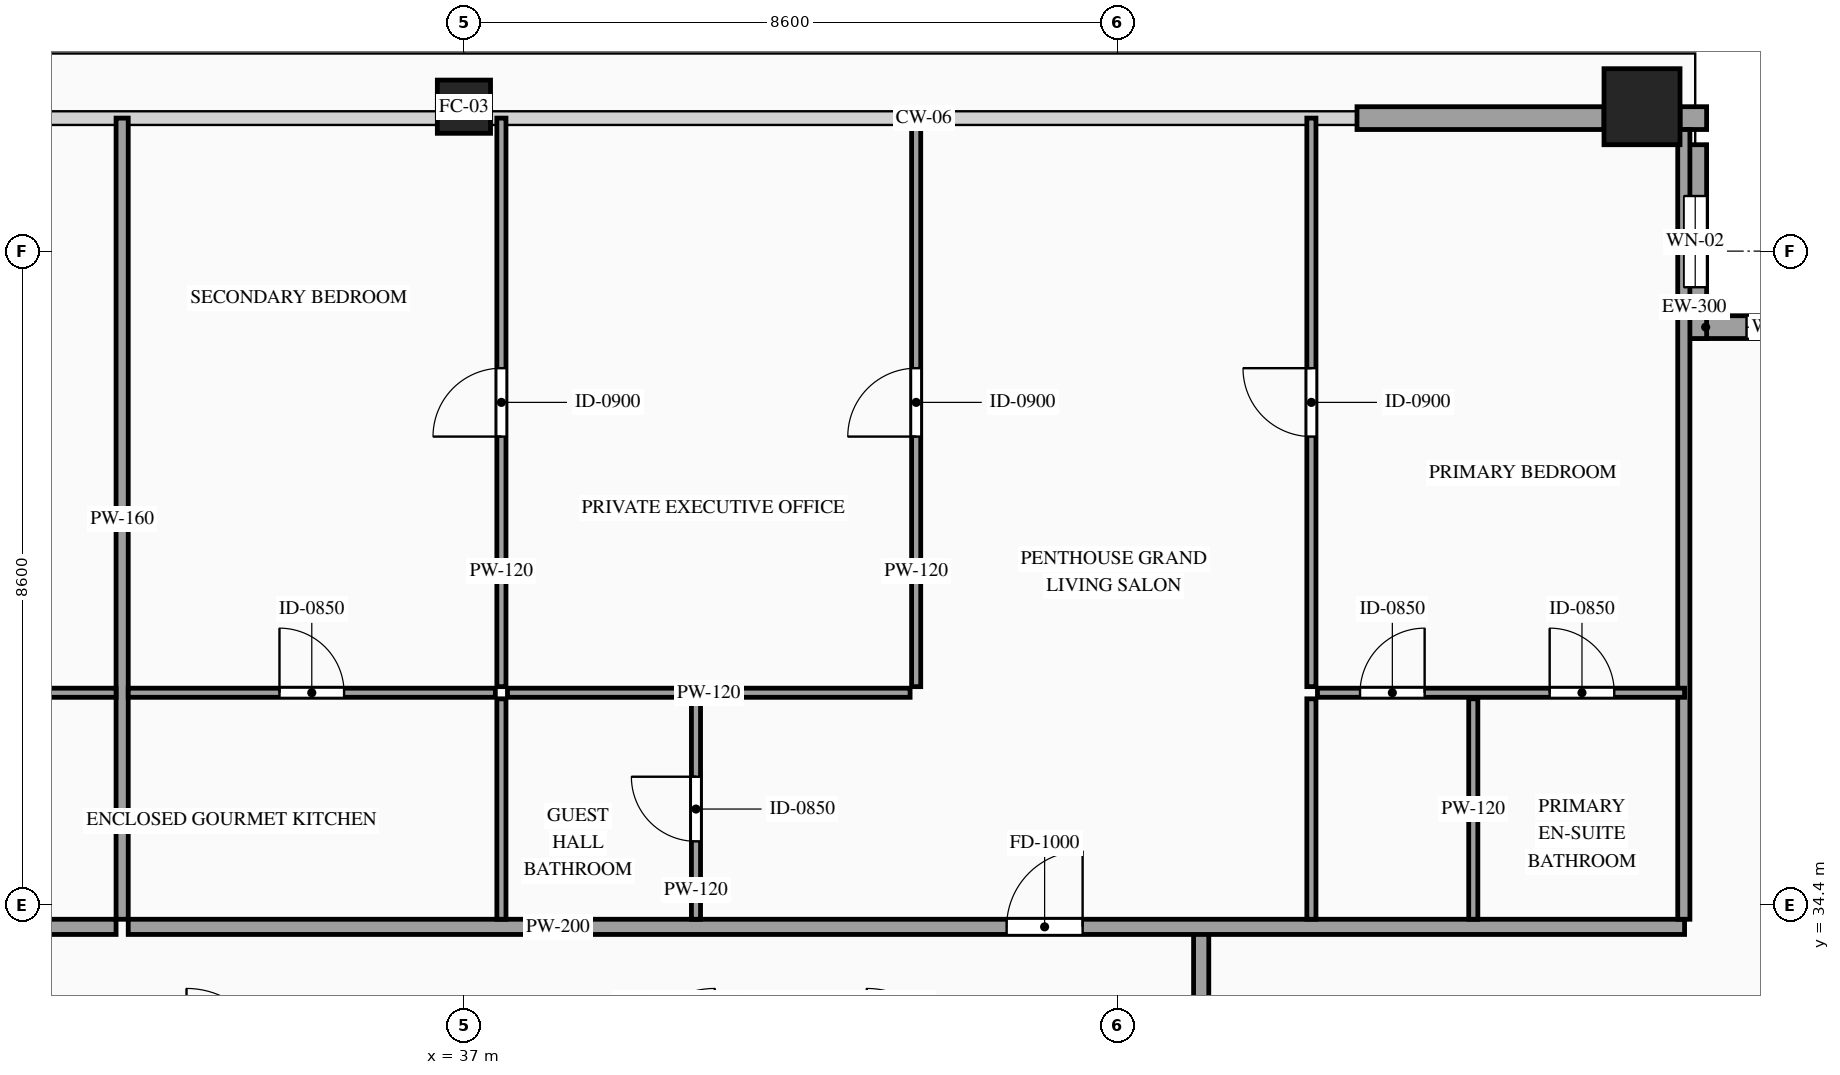
"""IFC4 building model, lengths in metres.
Left out: names, types, materials, properties, quantities, classifications, styles, units other than length and angle.
Written with IfcOpenShell. Run it as: python <this file> out.ifc"""

import sys

from ifc_helpers import new_model, si_unit, direction, frame, frame_2d, origin, origin_2d, place, context, subcontext, project, spatial, rectangle, hollow_rectangle, extrude, source, transform, mapped, element, fill, save


model = new_model("IFC4")
c1 = context("Model", 3, precision=1e-05, world=origin(), true_north=direction((0.0, 1.0)))
c2 = subcontext(c1, "Body", "Model", "MODEL_VIEW")
j1 = project(units=[si_unit("LENGTHUNIT", "METRE"), si_unit("PLANEANGLEUNIT", "RADIAN")], contexts=[c1])
p1 = place(None, origin())
s1 = spatial("IfcSite", under=j1, at=p1, CompositionType="ELEMENT")
p2 = place(p1, origin())
s2 = spatial("IfcBuilding", under=s1, at=p2, CompositionType="ELEMENT")
p3 = place(p2, frame((0.0, 0.0, 347.2)))
s3 = spatial("IfcBuildingStorey", under=s2, at=p3, CompositionType="ELEMENT", Elevation=347.2)
m1 = source(origin(), c2, "Body", "SweptSolid", [
    extrude(hollow_rectangle(XDim=0.7, YDim=0.7, WallThickness=0.032, at=origin_2d()), origin(), (0.0, 0.0, 1.0), 4.0),
])
p4 = place(p3, frame((37.0, 44.9, 0.0), z_axis=(0.0, 0.0, 1.0), x_axis=(1.0, 0.0, 0.0)))
e1 = element("IfcColumn", 1, at=p4, inside=s3, PredefinedType="COLUMN", context=c2, shape_type="MappedRepresentation", body=[
    mapped(m1, transform((0.0, 0.0, 0.0), scale=1.0)),
])
m2 = source(origin(), c2, "Body", "SweptSolid", [
    extrude(hollow_rectangle(XDim=1.0, YDim=1.0, WallThickness=0.048, at=origin_2d()), origin(), (0.0, 0.0, 1.0), 4.0),
])
p5 = place(p3, frame((52.5, 44.9, 0.0), z_axis=(0.0, 0.0, 1.0), x_axis=(1.0, 0.0, 0.0)))
e2 = element("IfcColumn", 2, at=p5, inside=s3, PredefinedType="COLUMN", context=c2, shape_type="MappedRepresentation", body=[
    mapped(m2, transform((0.0, 0.0, 0.0), scale=1.0)),
])
p6 = place(p3, frame((55.6, 42.0, 0.0), z_axis=(0.0, 0.0, 1.0), x_axis=(-1.0, 0.0, 0.0)))
e3 = element("IfcWall", 3, at=p6, inside=s3, PredefinedType="SOLIDWALL", context=c2, shape_type="SweptSolid", body=[
    extrude(rectangle(XDim=2.55, YDim=0.3, at=frame_2d((1.275, 0.0))), origin(), (0.0, 0.0, 1.0), 3.7),
])
p7 = place(p6, frame((0.825, 0.0, 0.85)))
e4 = element("IfcOpeningElement", 4, at=p7, cuts=e3, PredefinedType="OPENING", context=c2, shape_type="SweptSolid", body=[
    extrude(rectangle(XDim=0.9, YDim=1.5, at=frame_2d((0.45, 0.75))), frame((0.0, 0.165, 0.0), z_axis=(0.0, -1.0, 0.0), x_axis=(1.0, 0.0, 0.0)), (0.0, 0.0, 1.0), 0.33),
])
p8 = place(p3, frame((53.2, 41.85, 0.0), z_axis=(0.0, 0.0, 1.0), x_axis=(0.0, 1.0, 0.0)))
e5 = element("IfcWall", 5, at=p8, inside=s3, PredefinedType="SOLIDWALL", context=c2, shape_type="SweptSolid", body=[
    extrude(rectangle(XDim=2.55, YDim=0.3, at=frame_2d((1.275, 0.0))), origin(), (0.0, 0.0, 1.0), 3.7),
])
p9 = place(p8, frame((0.675, 0.0, 0.85)))
e6 = element("IfcOpeningElement", 6, at=p9, cuts=e5, PredefinedType="OPENING", context=c2, shape_type="SweptSolid", body=[
    extrude(rectangle(XDim=1.2, YDim=2.1, at=frame_2d((0.6, 1.05))), frame((0.0, 0.165, 0.0), z_axis=(0.0, -1.0, 0.0), x_axis=(1.0, 0.0, 0.0)), (0.0, 0.0, 1.0), 0.33),
])
m3 = source(origin(), c2, "Body", "SweptSolid", [
    extrude(rectangle(XDim=0.35, YDim=0.3, at=frame_2d((0.175, 0.0))), origin(), (0.0, 0.0, 1.0), 3.7),
])
p10 = place(p3, frame((53.0, 44.75, 0.0), z_axis=(0.0, 0.0, 1.0), x_axis=(1.0, 0.0, 0.0)))
e7 = element("IfcWall", 7, at=p10, inside=s3, PredefinedType="SOLIDWALL", context=c2, shape_type="MappedRepresentation", body=[
    mapped(m3, transform((0.0, 0.0, 0.0), scale=1.0)),
])
m4 = source(origin(), c2, "Body", "SweptSolid", [
    extrude(rectangle(XDim=3.25, YDim=0.3, at=frame_2d((1.625, 0.0))), origin(), (0.0, 0.0, 1.0), 3.305),
])
p11 = place(p3, frame((48.75, 44.75, 0.0), z_axis=(0.0, 0.0, 1.0), x_axis=(1.0, 0.0, 0.0)))
e8 = element("IfcWall", 8, at=p11, inside=s3, PredefinedType="SOLIDWALL", context=c2, shape_type="MappedRepresentation", body=[
    mapped(m4, transform((0.0, 0.0, 0.0), scale=1.0)),
])
m5 = source(origin(), c2, "Body", "SweptSolid", [
    extrude(rectangle(XDim=1.7, YDim=0.2, at=frame_2d((0.85, 0.0))), origin(), (0.0, 0.0, 1.0), 3.7),
])
p12 = place(p3, frame((46.7, 32.35, 0.0), z_axis=(0.0, 0.0, 1.0), x_axis=(0.0, 1.0, 0.0)))
e9 = element("IfcWall", 9, at=p12, inside=s3, PredefinedType="PARTITIONING", context=c2, shape_type="MappedRepresentation", body=[
    mapped(m5, transform((0.0, 0.0, 0.0), scale=1.0)),
])
p13 = place(p3, frame((20.94, 34.11, 0.0), z_axis=(0.0, 0.0, 1.0), x_axis=(1.0, 0.0, 0.0)))
e10 = element("IfcWall", 10, at=p13, inside=s3, PredefinedType="PARTITIONING", context=c2, shape_type="SweptSolid", body=[
    extrude(rectangle(XDim=11.483, YDim=0.2, at=frame_2d((5.742, 0.0))), origin(), (0.0, 0.0, 1.0), 3.7),
])
p14 = place(p13, frame((4.552, 0.0, 0.0)))
e11 = element("IfcOpeningElement", 11, at=p14, cuts=e10, PredefinedType="OPENING", context=c2, shape_type="SweptSolid", body=[
    extrude(rectangle(XDim=1.0, YDim=2.2, at=frame_2d((0.5, 1.1))), frame((0.0, 0.115, 0.0), z_axis=(0.0, -1.0, 0.0), x_axis=(1.0, 0.0, 0.0)), (0.0, 0.0, 1.0), 0.23),
])
m6 = source(origin(), c2, "Body", "SweptSolid", [
    extrude(rectangle(XDim=10.54, YDim=0.16, at=frame_2d((5.27, 0.0))), origin(), (0.0, 0.0, 1.0), 3.7),
])
p15 = place(p3, frame((32.503, 34.21, 0.0), z_axis=(0.0, 0.0, 1.0), x_axis=(0.0, 1.0, 0.0)))
e12 = element("IfcWall", 12, at=p15, inside=s3, PredefinedType="PARTITIONING", context=c2, shape_type="MappedRepresentation", body=[
    mapped(m6, transform((0.0, 0.0, 0.0), scale=1.0)),
])
m7 = source(origin(), c2, "Body", "SweptSolid", [
    extrude(rectangle(XDim=4.823, YDim=0.12, at=frame_2d((2.412, 0.0))), origin(), (0.0, 0.0, 1.0), 3.7),
])
p16 = place(p3, frame((27.6, 37.19, 0.0), z_axis=(0.0, 0.0, 1.0), x_axis=(1.0, 0.0, 0.0)))
e13 = element("IfcWall", 13, at=p16, inside=s3, PredefinedType="PARTITIONING", context=c2, shape_type="MappedRepresentation", body=[
    mapped(m7, transform((0.0, 0.0, 0.0), scale=1.0)),
])
p17 = place(p3, frame((32.583, 34.11, 0.0), z_axis=(0.0, 0.0, 1.0), x_axis=(1.0, 0.0, 0.0)))
e14 = element("IfcWall", 14, at=p17, inside=s3, PredefinedType="PARTITIONING", context=c2, shape_type="SweptSolid", body=[
    extrude(rectangle(XDim=20.477, YDim=0.2, at=frame_2d((10.239, 0.0))), origin(), (0.0, 0.0, 1.0), 3.7),
])
p18 = place(p17, frame((11.557, 0.0, 0.0)))
e15 = element("IfcOpeningElement", 15, at=p18, cuts=e14, PredefinedType="OPENING", context=c2, shape_type="SweptSolid", body=[
    extrude(rectangle(XDim=1.0, YDim=2.2, at=frame_2d((0.5, 1.1))), frame((0.0, 0.115, 0.0), z_axis=(0.0, -1.0, 0.0), x_axis=(1.0, 0.0, 0.0)), (0.0, 0.0, 1.0), 0.23),
])
m8 = source(origin(), c2, "Body", "SweptSolid", [
    extrude(rectangle(XDim=10.39, YDim=0.16, at=frame_2d((5.195, 0.0))), origin(), (0.0, 0.0, 1.0), 3.7),
])
p19 = place(p3, frame((53.05, 34.21, 0.0), z_axis=(0.0, 0.0, 1.0), x_axis=(0.0, 1.0, 0.0)))
e16 = element("IfcWall", 16, at=p19, inside=s3, PredefinedType="PARTITIONING", context=c2, shape_type="MappedRepresentation", body=[
    mapped(m8, transform((0.0, 0.0, 0.0), scale=1.0)),
])
p20 = place(p3, frame((32.583, 37.19, 0.0), z_axis=(0.0, 0.0, 1.0), x_axis=(1.0, 0.0, 0.0)))
e17 = element("IfcWall", 17, at=p20, inside=s3, PredefinedType="PARTITIONING", context=c2, shape_type="SweptSolid", body=[
    extrude(rectangle(XDim=4.83, YDim=0.12, at=frame_2d((2.415, 0.0))), origin(), (0.0, 0.0, 1.0), 3.7),
])
p21 = place(p20, frame((1.99, 0.0, 0.0)))
e18 = element("IfcOpeningElement", 18, at=p21, cuts=e17, PredefinedType="OPENING", context=c2, shape_type="SweptSolid", body=[
    extrude(rectangle(XDim=0.85, YDim=2.1, at=frame_2d((0.425, 1.05))), frame((0.0, 0.075, 0.0), z_axis=(0.0, -1.0, 0.0), x_axis=(1.0, 0.0, 0.0)), (0.0, 0.0, 1.0), 0.15),
])
m9 = source(origin(), c2, "Body", "SweptSolid", [
    extrude(rectangle(XDim=2.9, YDim=0.12, at=frame_2d((1.45, 0.0))), origin(), (0.0, 0.0, 1.0), 3.7),
])
p22 = place(p3, frame((37.493, 34.21, 0.0), z_axis=(0.0, 0.0, 1.0), x_axis=(0.0, 1.0, 0.0)))
e19 = element("IfcWall", 19, at=p22, inside=s3, PredefinedType="PARTITIONING", context=c2, shape_type="MappedRepresentation", body=[
    mapped(m9, transform((0.0, 0.0, 0.0), scale=1.0)),
])
p23 = place(p3, frame((40.053, 34.21, 0.0), z_axis=(0.0, 0.0, 1.0), x_axis=(0.0, 1.0, 0.0)))
e20 = element("IfcWall", 20, at=p23, inside=s3, PredefinedType="PARTITIONING", context=c2, shape_type="SweptSolid", body=[
    extrude(rectangle(XDim=2.9, YDim=0.12, at=frame_2d((1.45, 0.0))), origin(), (0.0, 0.0, 1.0), 3.7),
])
p24 = place(p23, frame((1.025, 0.0, 0.0)))
e21 = element("IfcOpeningElement", 21, at=p24, cuts=e20, PredefinedType="OPENING", context=c2, shape_type="SweptSolid", body=[
    extrude(rectangle(XDim=0.85, YDim=2.1, at=frame_2d((0.425, 1.05))), frame((0.0, 0.075, 0.0), z_axis=(0.0, -1.0, 0.0), x_axis=(1.0, 0.0, 0.0)), (0.0, 0.0, 1.0), 0.15),
])
m10 = source(origin(), c2, "Body", "SweptSolid", [
    extrude(rectangle(XDim=2.9, YDim=0.12, at=frame_2d((1.45, 0.0))), origin(), (0.0, 0.0, 1.0), 3.245),
])
p25 = place(p3, frame((50.28, 34.21, 0.0), z_axis=(0.0, 0.0, 1.0), x_axis=(0.0, 1.0, 0.0)))
e22 = element("IfcWall", 22, at=p25, inside=s3, PredefinedType="PARTITIONING", context=c2, shape_type="MappedRepresentation", body=[
    mapped(m10, transform((0.0, 0.0, 0.0), scale=1.0)),
])
p26 = place(p3, frame((48.15, 34.21, 0.0), z_axis=(0.0, 0.0, 1.0), x_axis=(0.0, 1.0, 0.0)))
e23 = element("IfcWall", 23, at=p26, inside=s3, PredefinedType="PARTITIONING", context=c2, shape_type="MappedRepresentation", body=[
    mapped(m9, transform((0.0, 0.0, 0.0), scale=1.0)),
])
p27 = place(p3, frame((37.493, 37.27, 0.0), z_axis=(0.0, 0.0, 1.0), x_axis=(0.0, 1.0, 0.0)))
e24 = element("IfcWall", 24, at=p27, inside=s3, PredefinedType="PARTITIONING", context=c2, shape_type="SweptSolid", body=[
    extrude(rectangle(XDim=7.48, YDim=0.12, at=frame_2d((3.74, 0.0))), origin(), (0.0, 0.0, 1.0), 3.7),
])
p28 = place(p27, frame((3.29, 0.0, 0.0)))
e25 = element("IfcOpeningElement", 25, at=p28, cuts=e24, PredefinedType="OPENING", context=c2, shape_type="SweptSolid", body=[
    extrude(rectangle(XDim=0.9, YDim=2.15, at=frame_2d((0.45, 1.075))), frame((0.0, 0.075, 0.0), z_axis=(0.0, -1.0, 0.0), x_axis=(1.0, 0.0, 0.0)), (0.0, 0.0, 1.0), 0.15),
])
p29 = place(p3, frame((48.23, 37.19, 0.0), z_axis=(0.0, 0.0, 1.0), x_axis=(1.0, 0.0, 0.0)))
e26 = element("IfcWall", 26, at=p29, inside=s3, PredefinedType="PARTITIONING", context=c2, shape_type="SweptSolid", body=[
    extrude(rectangle(XDim=4.83, YDim=0.12, at=frame_2d((2.415, 0.0))), origin(), (0.0, 0.0, 1.0), 3.7),
])
p30 = place(p29, frame((3.055, 0.0, 0.0)))
e27 = element("IfcOpeningElement", 27, at=p30, cuts=e26, PredefinedType="OPENING", context=c2, shape_type="SweptSolid", body=[
    extrude(rectangle(XDim=0.85, YDim=2.1, at=frame_2d((0.425, 1.05))), frame((0.0, 0.075, 0.0), z_axis=(0.0, -1.0, 0.0), x_axis=(1.0, 0.0, 0.0)), (0.0, 0.0, 1.0), 0.15),
])
p31 = place(p29, frame((0.56, 0.0, 0.0)))
e28 = element("IfcOpeningElement", 28, at=p31, cuts=e26, PredefinedType="OPENING", context=c2, shape_type="SweptSolid", body=[
    extrude(rectangle(XDim=0.85, YDim=2.1, at=frame_2d((0.425, 1.05))), frame((0.0, 0.075, 0.0), z_axis=(0.0, -1.0, 0.0), x_axis=(1.0, 0.0, 0.0)), (0.0, 0.0, 1.0), 0.15),
])
p32 = place(p3, frame((48.15, 37.27, 0.0), z_axis=(0.0, 0.0, 1.0), x_axis=(0.0, 1.0, 0.0)))
e29 = element("IfcWall", 29, at=p32, inside=s3, PredefinedType="PARTITIONING", context=c2, shape_type="SweptSolid", body=[
    extrude(rectangle(XDim=7.48, YDim=0.12, at=frame_2d((3.74, 0.0))), origin(), (0.0, 0.0, 1.0), 3.7),
])
p33 = place(p32, frame((3.29, 0.0, 0.0)))
e30 = element("IfcOpeningElement", 30, at=p33, cuts=e29, PredefinedType="OPENING", context=c2, shape_type="SweptSolid", body=[
    extrude(rectangle(XDim=0.9, YDim=2.15, at=frame_2d((0.45, 1.075))), frame((0.0, 0.075, 0.0), z_axis=(0.0, -1.0, 0.0), x_axis=(1.0, 0.0, 0.0)), (0.0, 0.0, 1.0), 0.15),
])
m11 = source(origin(), c2, "Body", "SweptSolid", [
    extrude(rectangle(XDim=5.297, YDim=0.12, at=frame_2d((2.648, 0.0))), origin(), (0.0, 0.0, 1.0), 3.7),
])
p34 = place(p3, frame((37.573, 37.19, 0.0), z_axis=(0.0, 0.0, 1.0), x_axis=(1.0, 0.0, 0.0)))
e31 = element("IfcWall", 31, at=p34, inside=s3, PredefinedType="PARTITIONING", context=c2, shape_type="MappedRepresentation", body=[
    mapped(m11, transform((0.0, 0.0, 0.0), scale=1.0)),
])
p35 = place(p3, frame((42.95, 37.27, 0.0), z_axis=(0.0, 0.0, 1.0), x_axis=(0.0, 1.0, 0.0)))
e32 = element("IfcWall", 32, at=p35, inside=s3, PredefinedType="PARTITIONING", context=c2, shape_type="SweptSolid", body=[
    extrude(rectangle(XDim=7.48, YDim=0.12, at=frame_2d((3.74, 0.0))), origin(), (0.0, 0.0, 1.0), 3.7),
])
p36 = place(p35, frame((3.29, 0.0, 0.0)))
e33 = element("IfcOpeningElement", 33, at=p36, cuts=e32, PredefinedType="OPENING", context=c2, shape_type="SweptSolid", body=[
    extrude(rectangle(XDim=0.9, YDim=2.15, at=frame_2d((0.45, 1.075))), frame((0.0, 0.075, 0.0), z_axis=(0.0, -1.0, 0.0), x_axis=(1.0, 0.0, 0.0)), (0.0, 0.0, 1.0), 0.15),
])
m12 = source(origin(), c2, "Body", "SweptSolid", [
    extrude(rectangle(XDim=0.9, YDim=1.5, at=frame_2d((0.45, 0.75))), frame((0.0, 0.03, 0.0), z_axis=(0.0, -1.0, 0.0), x_axis=(1.0, 0.0, 0.0)), (0.0, 0.0, 1.0), 0.06),
])
p37 = place(p7, origin())
e34 = element("IfcWindow", 34, at=p37, inside=s3, PartitioningType="SINGLE_PANEL", PredefinedType="WINDOW", context=c2, shape_type="MappedRepresentation", body=[
    mapped(m12, transform((0.0, 0.0, 0.0), scale=1.0)),
])
fill(e4, e34)
m13 = source(origin(), c2, "Body", "SweptSolid", [
    extrude(rectangle(XDim=1.2, YDim=2.1, at=frame_2d((0.6, 1.05))), frame((0.0, 0.03, 0.0), z_axis=(0.0, -1.0, 0.0), x_axis=(1.0, 0.0, 0.0)), (0.0, 0.0, 1.0), 0.06),
])
p38 = place(p9, origin())
e35 = element("IfcWindow", 35, at=p38, inside=s3, PartitioningType="SINGLE_PANEL", PredefinedType="WINDOW", context=c2, shape_type="MappedRepresentation", body=[
    mapped(m13, transform((0.0, 0.0, 0.0), scale=1.0)),
])
fill(e6, e35)
m14 = source(origin(), c2, "Body", "SweptSolid", [
    extrude(rectangle(XDim=1.0, YDim=2.2, at=frame_2d((0.5, 1.1))), frame((0.0, 0.025, 0.0), z_axis=(0.0, -1.0, 0.0), x_axis=(1.0, 0.0, 0.0)), (0.0, 0.0, 1.0), 0.05),
])
p39 = place(p18, origin())
e36 = element("IfcDoor", 36, at=p39, inside=s3, OperationType="SINGLE_SWING_RIGHT", PredefinedType="DOOR", context=c2, shape_type="MappedRepresentation", body=[
    mapped(m14, transform((0.0, 0.0, 0.0), scale=1.0)),
])
fill(e15, e36)
m15 = source(origin(), c2, "Body", "SweptSolid", [
    extrude(rectangle(XDim=0.85, YDim=2.1, at=frame_2d((0.425, 1.05))), frame((0.0, 0.025, 0.0), z_axis=(0.0, -1.0, 0.0), x_axis=(1.0, 0.0, 0.0)), (0.0, 0.0, 1.0), 0.05),
])
p40 = place(p21, origin())
e37 = element("IfcDoor", 37, at=p40, inside=s3, OperationType="SINGLE_SWING_LEFT", PredefinedType="DOOR", context=c2, shape_type="MappedRepresentation", body=[
    mapped(m15, transform((0.0, 0.0, 0.0), scale=1.0)),
])
fill(e18, e37)
p41 = place(p24, origin())
e38 = element("IfcDoor", 38, at=p41, inside=s3, OperationType="SINGLE_SWING_RIGHT", PredefinedType="DOOR", context=c2, shape_type="MappedRepresentation", body=[
    mapped(m15, transform((0.0, 0.0, 0.0), scale=1.0)),
])
fill(e21, e38)
p42 = place(p30, origin())
e39 = element("IfcDoor", 39, at=p42, inside=s3, OperationType="SINGLE_SWING_LEFT", PredefinedType="DOOR", context=c2, shape_type="MappedRepresentation", body=[
    mapped(m15, transform((0.0, 0.0, 0.0), scale=1.0)),
])
fill(e27, e39)
p43 = place(p31, origin())
e40 = element("IfcDoor", 40, at=p43, inside=s3, OperationType="SINGLE_SWING_RIGHT", PredefinedType="DOOR", context=c2, shape_type="MappedRepresentation", body=[
    mapped(m15, transform((0.0, 0.0, 0.0), scale=1.0)),
])
fill(e28, e40)
m16 = source(origin(), c2, "Body", "SweptSolid", [
    extrude(rectangle(XDim=0.9, YDim=2.15, at=frame_2d((0.45, 1.075))), frame((0.0, 0.025, 0.0), z_axis=(0.0, -1.0, 0.0), x_axis=(1.0, 0.0, 0.0)), (0.0, 0.0, 1.0), 0.05),
])
p44 = place(p28, origin())
e41 = element("IfcDoor", 41, at=p44, inside=s3, OperationType="SINGLE_SWING_LEFT", PredefinedType="DOOR", context=c2, shape_type="MappedRepresentation", body=[
    mapped(m16, transform((0.0, 0.0, 0.0), scale=1.0)),
])
fill(e25, e41)
p45 = place(p33, origin())
e42 = element("IfcDoor", 42, at=p45, inside=s3, OperationType="SINGLE_SWING_RIGHT", PredefinedType="DOOR", context=c2, shape_type="MappedRepresentation", body=[
    mapped(m16, transform((0.0, 0.0, 0.0), scale=1.0)),
])
fill(e30, e42)
p46 = place(p36, origin())
e43 = element("IfcDoor", 43, at=p46, inside=s3, OperationType="SINGLE_SWING_LEFT", PredefinedType="DOOR", context=c2, shape_type="MappedRepresentation", body=[
    mapped(m16, transform((0.0, 0.0, 0.0), scale=1.0)),
])
fill(e33, e43)
save(model, sys.argv[1])
